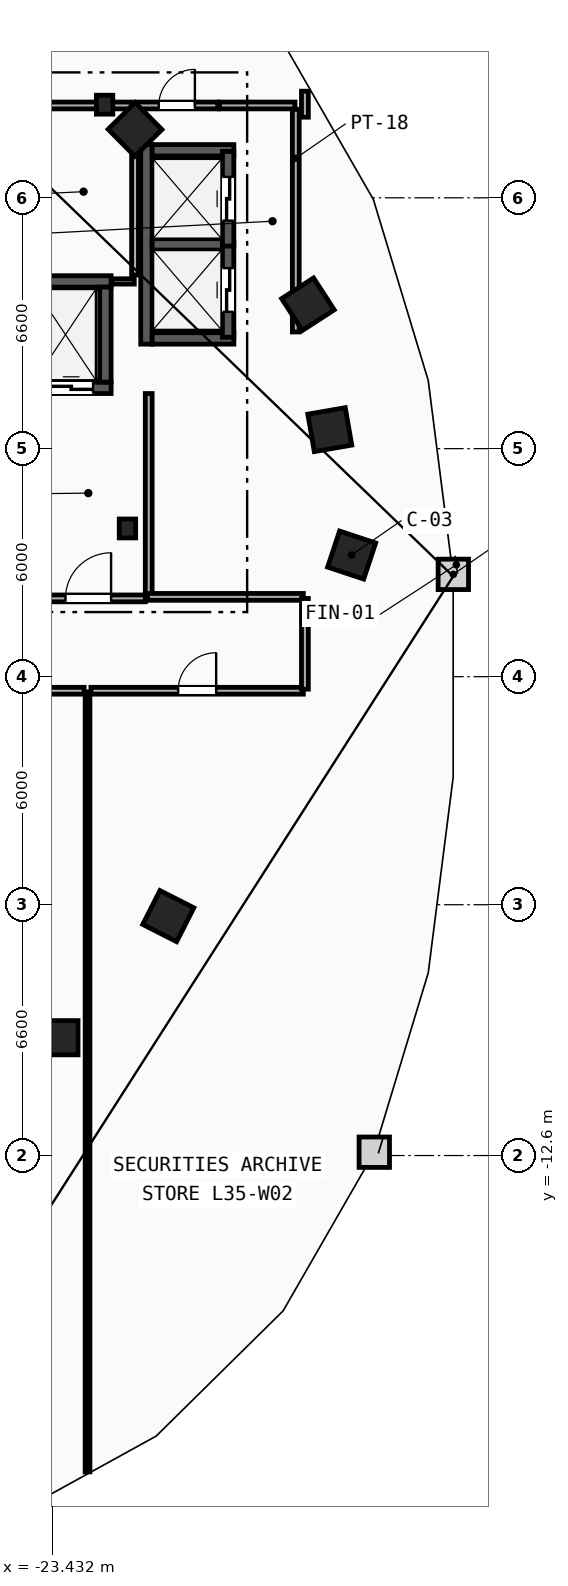
"""IFC4 building model, lengths in metres.
Left out: names, types, materials, properties, quantities, classifications, styles, units other than length and angle.
Written with IfcOpenShell. Run it as: python <this file> out.ifc"""

import sys

from ifc_helpers import new_model, si_unit, direction, frame, frame_2d, origin, origin_2d, place, context, subcontext, project, spatial, rectangle, i_section, extrude, element, fill, save


model = new_model("IFC4")
c1 = context("Model", 3, precision=1e-05, world=origin(), true_north=direction((0.0, 1.0)))
c2 = subcontext(c1, "Body", "Model", "MODEL_VIEW")
j1 = project(units=[si_unit("LENGTHUNIT", "METRE"), si_unit("PLANEANGLEUNIT", "RADIAN")], contexts=[c1])
p1 = place(None, origin())
s1 = spatial("IfcSite", under=j1, at=p1, CompositionType="ELEMENT")
p2 = place(p1, origin())
s2 = spatial("IfcBuilding", under=s1, at=p2, CompositionType="ELEMENT")
p3 = place(p2, frame((0.0, 0.0, 136.8)))
s3 = spatial("IfcBuildingStorey", under=s2, at=p3, CompositionType="ELEMENT", Elevation=136.8)
for number, where, z_axis, x_axis in (
    (1, (-21.45, 3.9, 0.0), (0.0, 0.0, 1.0), (1.0, 0.0, 0.0)),
    (2, (-22.05, 15.05, 0.0), (0.0, 0.0, 1.0), (1.0, 0.0, 0.0)),
):
    element("IfcColumn", number, at=place(p3, frame(where, z_axis=z_axis, x_axis=x_axis)), inside=s3, PredefinedType="COLUMN", context=c2, shape_type="SweptSolid", body=[
        extrude(i_section(OverallWidth=0.432, OverallDepth=0.498, WebThickness=0.056, FlangeThickness=0.089, FilletRadius=0.018, at=origin_2d()), origin(), (0.0, 0.0, 1.0), 3.6),
    ])
p4 = place(p3, frame((-23.2, -9.5, 0.0), z_axis=(0.0, 0.0, 1.0), x_axis=(1.0, 0.0, 0.0)))
e3 = element("IfcColumn", 3, at=p4, inside=s3, PredefinedType="COLUMN", context=c2, shape_type="SweptSolid", body=[
    extrude(rectangle(XDim=0.9, YDim=0.9, at=origin_2d()), origin(), (0.0, 0.0, 1.0), 3.6),
])
for number, where, z_axis, x_axis in (
    (4, (-15.55, 3.2, 0.0), (0.0, 0.0, 1.0), (0.315, 0.949, 0.0)),
    (5, (-16.125, 6.5, 0.0), (0.0, 0.0, 1.0), (-0.172, 0.985, 0.0)),
    (6, (-16.7, 9.8, 0.0), (0.0, 0.0, 1.0), (-0.544, 0.839, 0.0)),
    (7, (-21.25, 14.4, 0.0), (0.0, 0.0, 1.0), (-0.703, 0.711, 0.0)),
    (8, (-20.375, -6.3, 0.0), (0.0, 0.0, 1.0), (0.453, 0.892, 0.0)),
):
    element("IfcColumn", number, at=place(p3, frame(where, z_axis=z_axis, x_axis=x_axis)), inside=s3, PredefinedType="COLUMN", context=c2, shape_type="SweptSolid", body=[
        extrude(rectangle(XDim=1.0, YDim=1.0, at=origin_2d()), origin(), (0.0, 0.0, 1.0), 3.6),
    ])
p5 = place(p3, frame((-20.89, 2.15, 0.0), z_axis=(0.0, 0.0, 1.0), x_axis=(0.0, 1.0, 0.0)))
e9 = element("IfcWall", 9, at=p5, inside=s3, PredefinedType="PARTITIONING", context=c2, shape_type="SweptSolid", body=[
    extrude(rectangle(XDim=5.3, YDim=0.18, at=frame_2d((2.65, 0.0))), origin(), (0.0, 0.0, 1.0), 3.36),
])
p6 = place(p3, frame((-23.98, 2.06, 0.0), z_axis=(0.0, 0.0, 1.0), x_axis=(1.0, 0.0, 0.0)))
e10 = element("IfcWall", 10, at=p6, inside=s3, PredefinedType="PARTITIONING", context=c2, shape_type="SweptSolid", body=[
    extrude(rectangle(XDim=3.0, YDim=0.18, at=frame_2d((1.5, 0.0))), origin(), (0.0, 0.0, 1.0), 3.36),
])
p7 = place(p6, frame((0.9, 0.0, 0.0)))
e11 = element("IfcOpeningElement", 11, at=p7, cuts=e10, PredefinedType="OPENING", context=c2, shape_type="SweptSolid", body=[
    extrude(rectangle(XDim=1.2, YDim=2.15, at=frame_2d((0.6, 1.075))), frame((0.0, 0.1, 0.0), z_axis=(0.0, -1.0, 0.0), x_axis=(1.0, 0.0, 0.0)), (0.0, 0.0, 1.0), 0.2),
])
p8 = place(p3, frame((-23.98, 7.6, 0.0), z_axis=(0.0, 0.0, 1.0), x_axis=(1.0, 0.0, 0.0)))
e12 = element("IfcWall", 12, at=p8, inside=s3, PredefinedType="SHEAR", context=c2, shape_type="SweptSolid", body=[
    extrude(rectangle(XDim=2.1, YDim=0.3, at=frame_2d((1.05, 0.0))), origin(), (0.0, 0.0, 1.0), 3.36),
])
p9 = place(p8, frame((0.475, 0.0, 0.0)))
e13 = element("IfcOpeningElement", 13, at=p9, cuts=e12, PredefinedType="OPENING", context=c2, shape_type="SweptSolid", body=[
    extrude(rectangle(XDim=1.15, YDim=2.2, at=frame_2d((0.575, 1.1))), frame((0.0, 0.16, 0.0), z_axis=(0.0, -1.0, 0.0), x_axis=(1.0, 0.0, 0.0)), (0.0, 0.0, 1.0), 0.32),
])
p10 = place(p3, frame((-23.98, 10.4, 0.0), z_axis=(0.0, 0.0, 1.0), x_axis=(1.0, 0.0, 0.0)))
e14 = element("IfcWall", 14, at=p10, inside=s3, PredefinedType="SHEAR", context=c2, shape_type="SweptSolid", body=[
    extrude(rectangle(XDim=2.1, YDim=0.3, at=frame_2d((1.05, 0.0))), origin(), (0.0, 0.0, 1.0), 3.36),
])
p11 = place(p3, frame((-22.03, 7.75, 0.0), z_axis=(0.0, 0.0, 1.0), x_axis=(0.0, 1.0, 0.0)))
e15 = element("IfcWall", 15, at=p11, inside=s3, PredefinedType="SHEAR", context=c2, shape_type="SweptSolid", body=[
    extrude(rectangle(XDim=2.5, YDim=0.3, at=frame_2d((1.25, 0.0))), origin(), (0.0, 0.0, 1.0), 3.36),
])
p12 = place(p3, frame((-20.95, 8.75, 0.0), z_axis=(0.0, 0.0, 1.0), x_axis=(0.0, 1.0, 0.0)))
e16 = element("IfcWall", 16, at=p12, inside=s3, PredefinedType="SHEAR", context=c2, shape_type="SweptSolid", body=[
    extrude(rectangle(XDim=5.25, YDim=0.3, at=frame_2d((2.625, 0.0))), origin(), (0.0, 0.0, 1.0), 3.36),
])
for number, where, z_axis, x_axis in (
    (17, (-20.8, 8.9, 0.0), (0.0, 0.0, 1.0), (1.0, 0.0, 0.0)),
    (18, (-20.8, 13.85, 0.0), (0.0, 0.0, 1.0), (1.0, 0.0, 0.0)),
):
    element("IfcWall", number, at=place(p3, frame(where, z_axis=z_axis, x_axis=x_axis)), inside=s3, PredefinedType="SHEAR", context=c2, shape_type="SweptSolid", body=[
        extrude(rectangle(XDim=2.15, YDim=0.3, at=frame_2d((1.075, 0.0))), origin(), (0.0, 0.0, 1.0), 3.36),
    ])
p13 = place(p3, frame((-20.8, 11.375, 0.0), z_axis=(0.0, 0.0, 1.0), x_axis=(1.0, 0.0, 0.0)))
e19 = element("IfcWall", 19, at=p13, inside=s3, PredefinedType="SHEAR", context=c2, shape_type="SweptSolid", body=[
    extrude(rectangle(XDim=1.85, YDim=0.3, at=frame_2d((0.925, 0.0))), origin(), (0.0, 0.0, 1.0), 3.36),
])
p14 = place(p3, frame((-18.8, 8.93, 0.0), z_axis=(0.0, 0.0, 1.0), x_axis=(0.0, 1.0, 0.0)))
e20 = element("IfcWall", 20, at=p14, inside=s3, PredefinedType="SHEAR", context=c2, shape_type="SweptSolid", body=[
    extrude(rectangle(XDim=2.49, YDim=0.3, at=frame_2d((1.245, 0.0))), origin(), (0.0, 0.0, 1.0), 3.36),
])
p15 = place(p14, frame((0.67, 0.0, 0.0)))
e21 = element("IfcOpeningElement", 21, at=p15, cuts=e20, PredefinedType="OPENING", context=c2, shape_type="SweptSolid", body=[
    extrude(rectangle(XDim=1.15, YDim=2.2, at=frame_2d((0.575, 1.1))), frame((0.0, 0.16, 0.0), z_axis=(0.0, -1.0, 0.0), x_axis=(1.0, 0.0, 0.0)), (0.0, 0.0, 1.0), 0.32),
])
p16 = place(p3, frame((-18.8, 11.33, 0.0), z_axis=(0.0, 0.0, 1.0), x_axis=(0.0, 1.0, 0.0)))
e22 = element("IfcWall", 22, at=p16, inside=s3, PredefinedType="SHEAR", context=c2, shape_type="SweptSolid", body=[
    extrude(rectangle(XDim=2.49, YDim=0.3, at=frame_2d((1.245, 0.0))), origin(), (0.0, 0.0, 1.0), 3.36),
])
p17 = place(p16, frame((0.67, 0.0, 0.0)))
e23 = element("IfcOpeningElement", 23, at=p17, cuts=e22, PredefinedType="OPENING", context=c2, shape_type="SweptSolid", body=[
    extrude(rectangle(XDim=1.15, YDim=2.2, at=frame_2d((0.575, 1.1))), frame((0.0, 0.16, 0.0), z_axis=(0.0, -1.0, 0.0), x_axis=(1.0, 0.0, 0.0)), (0.0, 0.0, 1.0), 0.32),
])
p18 = place(p3, frame((-17.02, 9.07, 0.0), z_axis=(0.0, 0.0, 1.0), x_axis=(0.0, 1.0, 0.0)))
e24 = element("IfcWall", 24, at=p18, inside=s3, PredefinedType="PARTITIONING", context=c2, shape_type="SweptSolid", body=[
    extrude(rectangle(XDim=5.86, YDim=0.18, at=frame_2d((2.93, 0.0))), origin(), (0.0, 0.0, 1.0), 3.36),
])
p19 = place(p3, frame((-21.23, 15.03, 0.0), z_axis=(0.0, 0.0, 1.0), x_axis=(1.0, 0.0, 0.0)))
e25 = element("IfcWall", 25, at=p19, inside=s3, PredefinedType="PARTITIONING", context=c2, shape_type="SweptSolid", body=[
    extrude(rectangle(XDim=2.16, YDim=0.18, at=frame_2d((1.08, 0.0))), origin(), (0.0, 0.0, 1.0), 3.36),
])
p20 = place(p19, frame((0.605, 0.0, 0.0)))
e26 = element("IfcOpeningElement", 26, at=p20, cuts=e25, PredefinedType="OPENING", context=c2, shape_type="SweptSolid", body=[
    extrude(rectangle(XDim=0.95, YDim=2.1, at=frame_2d((0.475, 1.05))), frame((0.0, 0.1, 0.0), z_axis=(0.0, -1.0, 0.0), x_axis=(1.0, 0.0, 0.0)), (0.0, 0.0, 1.0), 0.2),
])
p21 = place(p3, frame((-19.03, 15.03, 0.0), z_axis=(0.0, 0.0, 1.0), x_axis=(1.0, 0.0, 0.0)))
e27 = element("IfcWall", 27, at=p21, inside=s3, PredefinedType="PARTITIONING", context=c2, shape_type="SweptSolid", body=[
    extrude(rectangle(XDim=1.99, YDim=0.18, at=frame_2d((0.995, 0.0))), origin(), (0.0, 0.0, 1.0), 3.36),
])
p22 = place(p3, frame((-21.86, 10.4, 0.0), z_axis=(0.0, 0.0, 1.0), x_axis=(1.0, 0.0, 0.0)))
e28 = element("IfcWall", 28, at=p22, inside=s3, PredefinedType="PARTITIONING", context=c2, shape_type="SweptSolid", body=[
    extrude(rectangle(XDim=0.59, YDim=0.14, at=frame_2d((0.295, 0.0))), origin(), (0.0, 0.0, 1.0), 3.36),
])
p23 = place(p3, frame((-21.25, 10.57, 0.0), z_axis=(0.0, 0.0, 1.0), x_axis=(0.0, 1.0, 0.0)))
e29 = element("IfcWall", 29, at=p23, inside=s3, PredefinedType="PARTITIONING", context=c2, shape_type="SweptSolid", body=[
    extrude(rectangle(XDim=4.36, YDim=0.18, at=frame_2d((2.18, 0.0))), origin(), (0.0, 0.0, 1.0), 3.36),
])
p24 = place(p3, frame((-23.96, 15.03, 0.0), z_axis=(0.0, 0.0, 1.0), x_axis=(1.0, 0.0, 0.0)))
e30 = element("IfcWall", 30, at=p24, inside=s3, PredefinedType="PARTITIONING", context=c2, shape_type="SweptSolid", body=[
    extrude(rectangle(XDim=2.61, YDim=0.18, at=frame_2d((1.305, 0.0))), origin(), (0.0, 0.0, 1.0), 2.433),
])
p25 = place(p3, frame((-22.5, -20.923, 0.0), z_axis=(0.0, 0.0, 1.0), x_axis=(0.0, 1.0, 0.0)))
e31 = element("IfcWall", 31, at=p25, inside=s3, PredefinedType="PARTITIONING", context=c2, shape_type="SweptSolid", body=[
    extrude(rectangle(XDim=20.523, YDim=0.125, at=frame_2d((10.262, 0.0))), origin(), (0.0, 0.0, 1.0), 2.665),
])
p26 = place(p3, frame((-25.4, -0.37, 0.0), z_axis=(0.0, 0.0, 1.0), x_axis=(1.0, 0.0, 0.0)))
e32 = element("IfcWall", 32, at=p26, inside=s3, PredefinedType="PARTITIONING", context=c2, shape_type="SweptSolid", body=[
    extrude(rectangle(XDim=2.81, YDim=0.18, at=frame_2d((1.405, 0.0))), origin(), (0.0, 0.0, 1.0), 3.36),
])
p27 = place(p3, frame((-22.41, -0.37, 0.0), z_axis=(0.0, 0.0, 1.0), x_axis=(1.0, 0.0, 0.0)))
e33 = element("IfcWall", 33, at=p27, inside=s3, PredefinedType="PARTITIONING", context=c2, shape_type="SweptSolid", body=[
    extrude(rectangle(XDim=5.588, YDim=0.18, at=frame_2d((2.794, 0.0))), origin(), (0.0, 0.0, 1.0), 3.36),
])
p28 = place(p27, frame((2.294, 0.0, 0.0)))
e34 = element("IfcOpeningElement", 34, at=p28, cuts=e33, PredefinedType="OPENING", context=c2, shape_type="SweptSolid", body=[
    extrude(rectangle(XDim=1.0, YDim=2.15, at=frame_2d((0.5, 1.075))), frame((0.0, 0.1, 0.0), z_axis=(0.0, -1.0, 0.0), x_axis=(1.0, 0.0, 0.0)), (0.0, 0.0, 1.0), 0.2),
])
p29 = place(p3, frame((-16.822, 2.1, 0.0), z_axis=(0.0, 0.0, 1.0), x_axis=(-1.0, 0.0, 0.0)))
e35 = element("IfcWall", 35, at=p29, inside=s3, PredefinedType="PARTITIONING", context=c2, shape_type="SweptSolid", body=[
    extrude(rectangle(XDim=4.098, YDim=0.18, at=frame_2d((2.049, 0.0))), origin(), (0.0, 0.0, 1.0), 3.36),
])
p30 = place(p3, frame((-16.78, -0.329, 0.0), z_axis=(0.0, 0.0, 1.0), x_axis=(0.0, 1.0, 0.0)))
e36 = element("IfcWall", 36, at=p30, inside=s3, PredefinedType="PARTITIONING", context=c2, shape_type="SweptSolid", body=[
    extrude(rectangle(XDim=2.387, YDim=0.18, at=frame_2d((1.194, 0.0))), origin(), (0.0, 0.0, 1.0), 3.36),
])
p31 = place(p3, frame((-16.78, 14.721, 0.0), z_axis=(0.0, 0.0, 1.0), x_axis=(0.0, 1.0, 0.0)))
e37 = element("IfcWall", 37, at=p31, inside=s3, PredefinedType="PARTITIONING", context=c2, shape_type="SweptSolid", body=[
    extrude(rectangle(XDim=0.684, YDim=0.18, at=frame_2d((0.342, 0.0))), origin(), (0.0, 0.0, 1.0), 3.36),
])
p32 = place(p7, origin())
e38 = element("IfcDoor", 38, at=p32, inside=s3, OperationType="SINGLE_SWING_RIGHT", PredefinedType="DOOR", context=c2, shape_type="SweptSolid", body=[
    extrude(rectangle(XDim=1.2, YDim=2.15, at=frame_2d((0.6, 1.075))), frame((0.0, 0.025, 0.0), z_axis=(0.0, -1.0, 0.0), x_axis=(1.0, 0.0, 0.0)), (0.0, 0.0, 1.0), 0.05),
])
fill(e11, e38)
p33 = place(p9, origin())
e39 = element("IfcDoor", 39, at=p33, inside=s3, OperationType="SLIDING_TO_LEFT", PredefinedType="TRAPDOOR", context=c2, shape_type="SweptSolid", body=[
    extrude(rectangle(XDim=1.15, YDim=2.2, at=frame_2d((0.575, 1.1))), frame((0.0, 0.025, 0.0), z_axis=(0.0, -1.0, 0.0), x_axis=(1.0, 0.0, 0.0)), (0.0, 0.0, 1.0), 0.05),
])
fill(e13, e39)
p34 = place(p15, origin())
e40 = element("IfcDoor", 40, at=p34, inside=s3, OperationType="SLIDING_TO_LEFT", PredefinedType="TRAPDOOR", context=c2, shape_type="SweptSolid", body=[
    extrude(rectangle(XDim=1.15, YDim=2.2, at=frame_2d((0.575, 1.1))), frame((0.0, 0.025, 0.0), z_axis=(0.0, -1.0, 0.0), x_axis=(1.0, 0.0, 0.0)), (0.0, 0.0, 1.0), 0.05),
])
fill(e21, e40)
p35 = place(p17, origin())
e41 = element("IfcDoor", 41, at=p35, inside=s3, OperationType="SLIDING_TO_LEFT", PredefinedType="TRAPDOOR", context=c2, shape_type="SweptSolid", body=[
    extrude(rectangle(XDim=1.15, YDim=2.2, at=frame_2d((0.575, 1.1))), frame((0.0, 0.025, 0.0), z_axis=(0.0, -1.0, 0.0), x_axis=(1.0, 0.0, 0.0)), (0.0, 0.0, 1.0), 0.05),
])
fill(e23, e41)
p36 = place(p28, origin())
e42 = element("IfcDoor", 42, at=p36, inside=s3, OperationType="SINGLE_SWING_RIGHT", PredefinedType="DOOR", context=c2, shape_type="SweptSolid", body=[
    extrude(rectangle(XDim=1.0, YDim=2.15, at=frame_2d((0.5, 1.075))), frame((0.0, 0.025, 0.0), z_axis=(0.0, -1.0, 0.0), x_axis=(1.0, 0.0, 0.0)), (0.0, 0.0, 1.0), 0.05),
])
fill(e34, e42)
p37 = place(p20, origin())
e43 = element("IfcDoor", 43, at=p37, inside=s3, OperationType="SINGLE_SWING_RIGHT", PredefinedType="DOOR", context=c2, shape_type="SweptSolid", body=[
    extrude(rectangle(XDim=0.95, YDim=2.1, at=frame_2d((0.475, 1.05))), frame((0.0, 0.025, 0.0), z_axis=(0.0, -1.0, 0.0), x_axis=(1.0, 0.0, 0.0)), (0.0, 0.0, 1.0), 0.05),
])
fill(e26, e43)
save(model, sys.argv[1])
